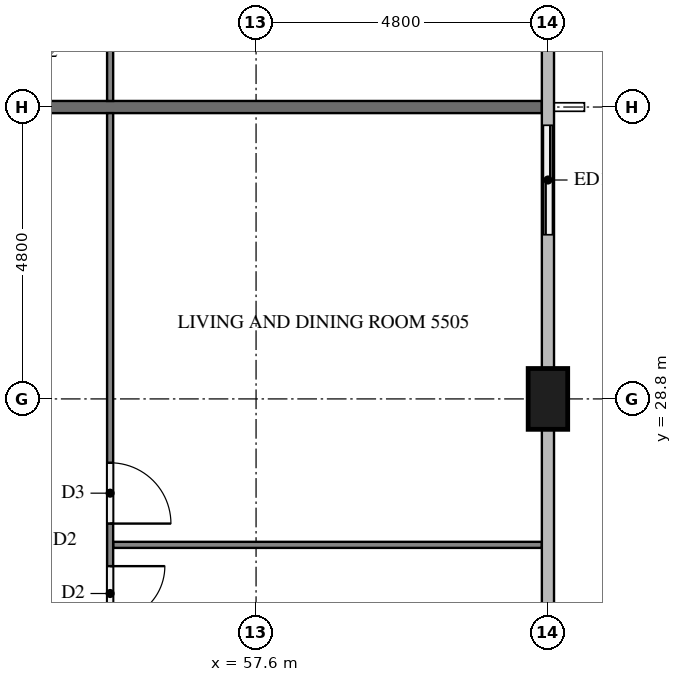
"""IFC4 building model, lengths in metres.
Left out: names, types, materials, properties, quantities, classifications, styles, units other than length and angle.
Written with IfcOpenShell. Run it as: python <this file> out.ifc"""

import sys

from ifc_helpers import new_model, si_unit, direction, frame, frame_2d, origin, origin_2d, place, context, subcontext, project, spatial, rectangle, extrude, element, fill, save


model = new_model("IFC4")
c1 = context("Model", 3, precision=1e-05, world=origin(), true_north=direction((0.0, 1.0)))
c2 = subcontext(c1, "Body", "Model", "MODEL_VIEW")
j1 = project(units=[si_unit("LENGTHUNIT", "METRE"), si_unit("PLANEANGLEUNIT", "RADIAN")], contexts=[c1])
p1 = place(None, origin())
s1 = spatial("IfcSite", under=j1, at=p1, CompositionType="ELEMENT")
p2 = place(p1, origin())
s2 = spatial("IfcBuilding", under=s1, at=p2, CompositionType="ELEMENT")
p3 = place(p2, frame((0.0, 0.0, 212.3)))
s3 = spatial("IfcBuildingStorey", under=s2, at=p3, CompositionType="ELEMENT", Elevation=212.3)
p4 = place(p3, frame((62.4, 28.8, 0.0), z_axis=(0.0, 0.0, 1.0), x_axis=(0.0, 1.0, 0.0)))
e1 = element("IfcColumn", 1, at=p4, inside=s3, PredefinedType="COLUMN", context=c2, shape_type="SweptSolid", body=[
    extrude(rectangle(XDim=1.0, YDim=0.65, at=origin_2d()), origin(), (0.0, 0.0, 1.0), 3.2),
])
p5 = place(p3, frame((62.4, 31.2, 0.0), z_axis=(0.0, 0.0, 1.0), x_axis=(0.0, 1.0, 0.0)))
e2 = element("IfcWall", 2, at=p5, inside=s3, PredefinedType="SOLIDWALL", context=c2, shape_type="SweptSolid", body=[
    extrude(rectangle(XDim=2.4, YDim=0.15, at=frame_2d((1.2, 0.0))), origin(), (0.0, 0.0, 1.0), 3.2),
])
p6 = place(p5, frame((0.3, 0.0, 0.0)))
e3 = element("IfcOpeningElement", 3, at=p6, cuts=e2, PredefinedType="OPENING", context=c2, shape_type="SweptSolid", body=[
    extrude(rectangle(XDim=1.8, YDim=2.4, at=frame_2d((0.9, 1.2))), frame((0.0, 0.085, 0.0), z_axis=(0.0, -1.0, 0.0), x_axis=(1.0, 0.0, 0.0)), (0.0, 0.0, 1.0), 0.17),
])
p7 = place(p3, frame((50.5, 33.6, 0.0), z_axis=(0.0, 0.0, 1.0), x_axis=(1.0, 0.0, 0.0)))
e4 = element("IfcWall", 4, at=p7, inside=s3, PredefinedType="PARTITIONING", context=c2, shape_type="SweptSolid", body=[
    extrude(rectangle(XDim=11.8, YDim=0.2, at=frame_2d((5.9, 0.0))), origin(), (0.0, 0.0, 1.0), 3.2),
])
p8 = place(p3, frame((55.25, 26.4, 0.0), z_axis=(0.0, 0.0, 1.0), x_axis=(1.0, 0.0, 0.0)))
e5 = element("IfcWall", 5, at=p8, inside=s3, PredefinedType="PARTITIONING", context=c2, shape_type="SweptSolid", body=[
    extrude(rectangle(XDim=7.05, YDim=0.1, at=frame_2d((3.525, 0.0))), origin(), (0.0, 0.0, 1.0), 3.2),
])
p9 = place(p3, frame((55.2, 33.5, 0.0), z_axis=(0.0, 0.0, 1.0), x_axis=(0.0, -1.0, 0.0)))
e6 = element("IfcWall", 6, at=p9, inside=s3, PredefinedType="PARTITIONING", context=c2, shape_type="SweptSolid", body=[
    extrude(rectangle(XDim=11.8, YDim=0.1, at=frame_2d((5.9, 0.0))), origin(), (0.0, 0.0, 1.0), 3.2),
])
p10 = place(p9, frame((5.75, 0.0, 0.0)))
e7 = element("IfcOpeningElement", 7, at=p10, cuts=e6, PredefinedType="OPENING", context=c2, shape_type="SweptSolid", body=[
    extrude(rectangle(XDim=1.0, YDim=2.1, at=frame_2d((0.5, 1.05))), frame((0.0, 0.06, 0.0), z_axis=(0.0, -1.0, 0.0), x_axis=(1.0, 0.0, 0.0)), (0.0, 0.0, 1.0), 0.12),
])
p11 = place(p9, frame((7.45, 0.0, 0.0)))
e8 = element("IfcOpeningElement", 8, at=p11, cuts=e6, PredefinedType="OPENING", context=c2, shape_type="SweptSolid", body=[
    extrude(rectangle(XDim=0.9, YDim=2.1, at=frame_2d((0.45, 1.05))), frame((0.0, 0.06, 0.0), z_axis=(0.0, -1.0, 0.0), x_axis=(1.0, 0.0, 0.0)), (0.0, 0.0, 1.0), 0.12),
])
p12 = place(p3, frame((55.2, 40.7, 0.0), z_axis=(0.0, 0.0, 1.0), x_axis=(0.0, -1.0, 0.0)))
e9 = element("IfcWall", 9, at=p12, inside=s3, PredefinedType="PARTITIONING", context=c2, shape_type="SweptSolid", body=[
    extrude(rectangle(XDim=7.0, YDim=0.1, at=frame_2d((3.5, 0.0))), origin(), (0.0, 0.0, 1.0), 3.2),
])
p13 = place(p12, frame((0.3, 0.0, 0.0)))
e10 = element("IfcOpeningElement", 10, at=p13, cuts=e9, PredefinedType="OPENING", context=c2, shape_type="SweptSolid", body=[
    extrude(rectangle(XDim=1.0, YDim=2.1, at=frame_2d((0.5, 1.05))), frame((0.0, 0.06, 0.0), z_axis=(0.0, -1.0, 0.0), x_axis=(1.0, 0.0, 0.0)), (0.0, 0.0, 1.0), 0.12),
])
p14 = place(p6, origin())
e11 = element("IfcDoor", 11, at=p14, inside=s3, OperationType="SLIDING_TO_RIGHT", PredefinedType="DOOR", context=c2, shape_type="SweptSolid", body=[
    extrude(rectangle(XDim=1.8, YDim=2.4, at=frame_2d((0.9, 1.2))), frame((0.0, 0.025, 0.0), z_axis=(0.0, -1.0, 0.0), x_axis=(1.0, 0.0, 0.0)), (0.0, 0.0, 1.0), 0.05),
])
fill(e3, e11)
p15 = place(p10, origin())
e12 = element("IfcDoor", 12, at=p15, inside=s3, OperationType="SINGLE_SWING_RIGHT", PredefinedType="DOOR", context=c2, shape_type="SweptSolid", body=[
    extrude(rectangle(XDim=1.0, YDim=2.1, at=frame_2d((0.5, 1.05))), frame((0.0, 0.025, 0.0), z_axis=(0.0, -1.0, 0.0), x_axis=(1.0, 0.0, 0.0)), (0.0, 0.0, 1.0), 0.05),
])
fill(e7, e12)
p16 = place(p11, origin())
e13 = element("IfcDoor", 13, at=p16, inside=s3, OperationType="SINGLE_SWING_LEFT", PredefinedType="DOOR", context=c2, shape_type="SweptSolid", body=[
    extrude(rectangle(XDim=0.9, YDim=2.1, at=frame_2d((0.45, 1.05))), frame((0.0, 0.025, 0.0), z_axis=(0.0, -1.0, 0.0), x_axis=(1.0, 0.0, 0.0)), (0.0, 0.0, 1.0), 0.05),
])
fill(e8, e13)
save(model, sys.argv[1])
